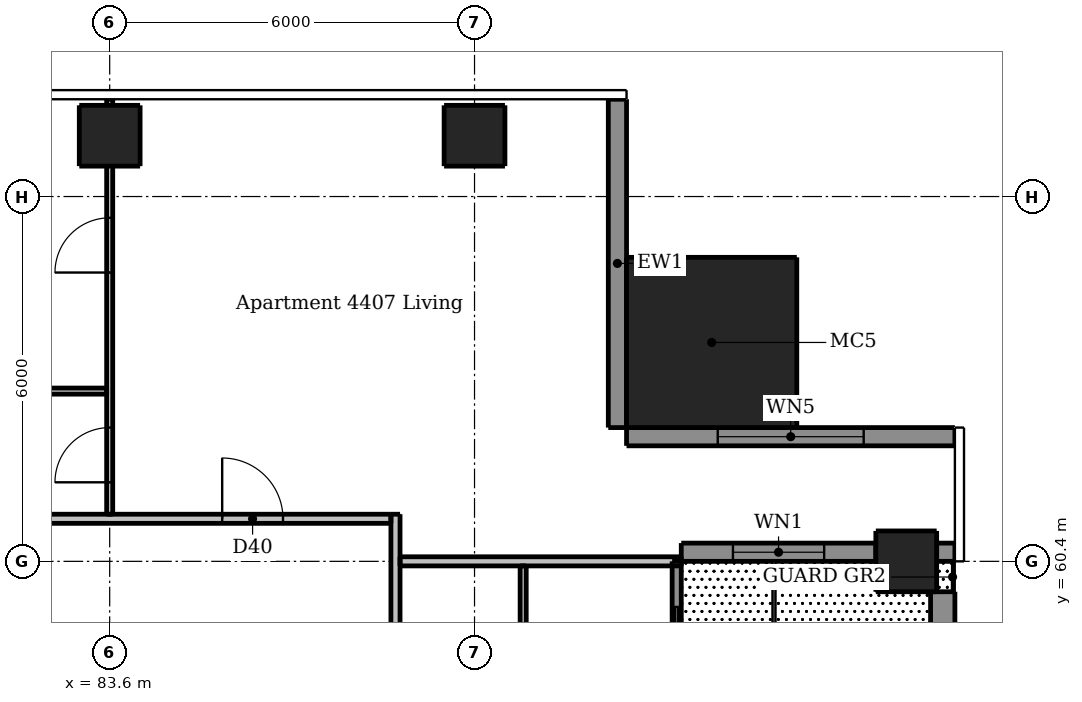
"""IFC4 building model, lengths in metres.
Left out: names, types, materials, properties, quantities, classifications, styles, units other than length and angle.
Written with IfcOpenShell. Run it as: python <this file> out.ifc"""

import sys

from ifc_helpers import new_model, si_unit, direction, frame, frame_2d, origin, origin_2d, place, context, subcontext, project, spatial, rectangle, extrude, element, fill, save


model = new_model("IFC4")
c1 = context("Model", 3, precision=1e-05, world=origin(), true_north=direction((0.0, 1.0)))
c2 = subcontext(c1, "Body", "Model", "MODEL_VIEW")
j1 = project(units=[si_unit("LENGTHUNIT", "METRE"), si_unit("PLANEANGLEUNIT", "RADIAN")], contexts=[c1])
p1 = place(None, origin())
s1 = spatial("IfcSite", under=j1, at=p1, CompositionType="ELEMENT")
p2 = place(p1, origin())
s2 = spatial("IfcBuilding", under=s1, at=p2, CompositionType="ELEMENT")
p3 = place(p2, frame((0.0, 0.0, 164.8)))
s3 = spatial("IfcBuildingStorey", under=s2, at=p3, CompositionType="ELEMENT", Elevation=164.8)
for number, where, z_axis, x_axis in (
    (1, (96.7, 60.4, 0.0), (0.0, 0.0, 1.0), (1.0, 0.0, 0.0)),
    (2, (83.6, 67.4, 0.0), (0.0, 0.0, 1.0), (1.0, 0.0, 0.0)),
    (3, (89.6, 67.4, 0.0), (0.0, 0.0, 1.0), (1.0, 0.0, 0.0)),
):
    element("IfcColumn", number, at=place(p3, frame(where, z_axis=z_axis, x_axis=x_axis)), inside=s3, PredefinedType="COLUMN", context=c2, shape_type="SweptSolid", body=[
        extrude(rectangle(XDim=1.0, YDim=1.0, at=origin_2d()), origin(), (0.0, 0.0, 1.0), 3.05),
    ])
p4 = place(p3, frame((93.5, 64.0, 0.0), z_axis=(0.0, 0.0, 1.0), x_axis=(1.0, 0.0, 0.0)))
e4 = element("IfcColumn", 4, at=p4, inside=s3, PredefinedType="COLUMN", context=c2, shape_type="SweptSolid", body=[
    extrude(rectangle(XDim=2.8, YDim=2.8, at=origin_2d()), origin(), (0.0, 0.0, 1.0), 3.3),
])
p5 = place(p3, frame((93.0, 60.55, 0.0), z_axis=(0.0, 0.0, 1.0), x_axis=(1.0, 0.0, 0.0)))
e5 = element("IfcWall", 5, at=p5, inside=s3, PredefinedType="SOLIDWALL", context=c2, shape_type="SweptSolid", body=[
    extrude(rectangle(XDim=3.2, YDim=0.3, at=frame_2d((1.6, 0.0))), origin(), (0.0, 0.0, 1.0), 3.05),
])
p6 = place(p5, frame((0.85, 0.0, 0.9)))
e6 = element("IfcOpeningElement", 6, at=p6, cuts=e5, PredefinedType="OPENING", context=c2, shape_type="SweptSolid", body=[
    extrude(rectangle(XDim=1.5, YDim=1.5, at=frame_2d((0.75, 0.75))), frame((0.0, 0.16, 0.0), z_axis=(0.0, -1.0, 0.0), x_axis=(1.0, 0.0, 0.0)), (0.0, 0.0, 1.0), 0.32),
])
p7 = place(p3, frame((97.2, 60.55, 0.0), z_axis=(0.0, 0.0, 1.0), x_axis=(1.0, 0.0, 0.0)))
e7 = element("IfcWall", 7, at=p7, inside=s3, PredefinedType="SOLIDWALL", context=c2, shape_type="SweptSolid", body=[
    extrude(rectangle(XDim=0.3, YDim=0.3, at=frame_2d((0.15, 0.0))), origin(), (0.0, 0.0, 1.0), 3.05),
])
p8 = place(p3, frame((97.5, 62.45, 0.0), z_axis=(0.0, 0.0, 1.0), x_axis=(-1.0, 0.0, 0.0)))
e8 = element("IfcWall", 8, at=p8, inside=s3, PredefinedType="SOLIDWALL", context=c2, shape_type="SweptSolid", body=[
    extrude(rectangle(XDim=5.4, YDim=0.3, at=frame_2d((2.7, 0.0))), origin(), (0.0, 0.0, 1.0), 3.05),
])
p9 = place(p8, frame((1.5, 0.0, 0.15)))
e9 = element("IfcOpeningElement", 9, at=p9, cuts=e8, PredefinedType="OPENING", context=c2, shape_type="SweptSolid", body=[
    extrude(rectangle(XDim=2.4, YDim=2.1, at=frame_2d((1.2, 1.05))), frame((0.0, 0.16, 0.0), z_axis=(0.0, -1.0, 0.0), x_axis=(1.0, 0.0, 0.0)), (0.0, 0.0, 1.0), 0.32),
])
p10 = place(p3, frame((91.95, 62.6, 0.0), z_axis=(0.0, 0.0, 1.0), x_axis=(0.0, 1.0, 0.0)))
e10 = element("IfcWall", 10, at=p10, inside=s3, PredefinedType="SOLIDWALL", context=c2, shape_type="SweptSolid", body=[
    extrude(rectangle(XDim=5.4, YDim=0.3, at=frame_2d((2.7, 0.0))), origin(), (0.0, 0.0, 1.0), 3.05),
])
p11 = place(p3, frame((92.925, 57.4, 0.0), z_axis=(0.0, 0.0, 1.0), x_axis=(0.0, 1.0, 0.0)))
e11 = element("IfcWall", 11, at=p11, inside=s3, PredefinedType="SOLIDWALL", context=c2, shape_type="SweptSolid", body=[
    extrude(rectangle(XDim=3.0, YDim=0.15, at=frame_2d((1.5, 0.0))), origin(), (0.0, 0.0, 1.0), 3.05),
])
p12 = place(p11, frame((0.75, 0.0, 0.0)))
e12 = element("IfcOpeningElement", 12, at=p12, cuts=e11, PredefinedType="OPENING", context=c2, shape_type="SweptSolid", body=[
    extrude(rectangle(XDim=1.5, YDim=2.4, at=frame_2d((0.75, 1.2))), frame((0.0, 0.085, 0.0), z_axis=(0.0, -1.0, 0.0), x_axis=(1.0, 0.0, 0.0)), (0.0, 0.0, 1.0), 0.17),
])
p13 = place(p3, frame((97.3, 54.9, 0.03), z_axis=(0.0, 0.0, 1.0), x_axis=(0.0, 1.0, 0.0)))
e13 = element("IfcWall", 13, at=p13, inside=s3, PredefinedType="PARAPET", context=c2, shape_type="SweptSolid", body=[
    extrude(rectangle(XDim=5.0, YDim=0.4, at=frame_2d((2.5, 0.0))), origin(), (0.0, 0.0, 1.0), 1.1),
])
p14 = place(p3, frame((83.6, 61.175, 0.0), z_axis=(0.0, 0.0, 1.0), x_axis=(0.0, 1.0, 0.0)))
e14 = element("IfcWall", 14, at=p14, inside=s3, PredefinedType="PARTITIONING", context=c2, shape_type="SweptSolid", body=[
    extrude(rectangle(XDim=6.825, YDim=0.1, at=frame_2d((3.413, 0.0))), origin(), (0.0, 0.0, 1.0), 2.516),
])
p15 = place(p14, frame((0.525, 0.0, 0.0)))
e15 = element("IfcOpeningElement", 15, at=p15, cuts=e14, PredefinedType="OPENING", context=c2, shape_type="SweptSolid", body=[
    extrude(rectangle(XDim=0.9, YDim=2.1, at=frame_2d((0.45, 1.05))), frame((0.0, 0.06, 0.0), z_axis=(0.0, -1.0, 0.0), x_axis=(1.0, 0.0, 0.0)), (0.0, 0.0, 1.0), 0.12),
])
p16 = place(p14, frame((3.975, 0.0, 0.0)))
e16 = element("IfcOpeningElement", 16, at=p16, cuts=e14, PredefinedType="OPENING", context=c2, shape_type="SweptSolid", body=[
    extrude(rectangle(XDim=0.9, YDim=2.1, at=frame_2d((0.45, 1.05))), frame((0.0, 0.06, 0.0), z_axis=(0.0, -1.0, 0.0), x_axis=(1.0, 0.0, 0.0)), (0.0, 0.0, 1.0), 0.12),
])
p17 = place(p3, frame((90.4, 58.25, 0.0), z_axis=(0.0, 0.0, 1.0), x_axis=(0.0, 1.0, 0.0)))
e17 = element("IfcWall", 17, at=p17, inside=s3, PredefinedType="PARTITIONING", context=c2, shape_type="SweptSolid", body=[
    extrude(rectangle(XDim=2.075, YDim=0.1, at=frame_2d((1.038, 0.0))), origin(), (0.0, 0.0, 1.0), 3.05),
])
p18 = place(p3, frame((83.55, 63.2, 0.0), z_axis=(0.0, 0.0, 1.0), x_axis=(-1.0, 0.0, 0.0)))
e18 = element("IfcWall", 18, at=p18, inside=s3, PredefinedType="PARTITIONING", context=c2, shape_type="SweptSolid", body=[
    extrude(rectangle(XDim=5.875, YDim=0.1, at=frame_2d((2.938, 0.0))), origin(), (0.0, 0.0, 1.0), 3.05),
])
p19 = place(p18, frame((3.75, 0.0, 0.0)))
e19 = element("IfcOpeningElement", 19, at=p19, cuts=e18, PredefinedType="OPENING", context=c2, shape_type="SweptSolid", body=[
    extrude(rectangle(XDim=0.8, YDim=2.1, at=frame_2d((0.4, 1.05))), frame((0.0, 0.06, 0.0), z_axis=(0.0, -1.0, 0.0), x_axis=(1.0, 0.0, 0.0)), (0.0, 0.0, 1.0), 0.12),
])
p20 = place(p3, frame((88.3, 61.175, 0.0), z_axis=(0.0, 0.0, 1.0), x_axis=(0.0, -1.0, 0.0)))
e20 = element("IfcWall", 20, at=p20, inside=s3, PredefinedType="PARTITIONING", context=c2, shape_type="SweptSolid", body=[
    extrude(rectangle(XDim=29.4, YDim=0.15, at=frame_2d((14.7, 0.0))), origin(), (0.0, 0.0, 1.0), 3.05),
])
p21 = place(p20, frame((28.125, 0.0, 0.0)))
e21 = element("IfcOpeningElement", 21, at=p21, cuts=e20, PredefinedType="OPENING", context=c2, shape_type="SweptSolid", body=[
    extrude(rectangle(XDim=1.0, YDim=2.1, at=frame_2d((0.5, 1.05))), frame((0.0, 0.085, 0.0), z_axis=(0.0, -1.0, 0.0), x_axis=(1.0, 0.0, 0.0)), (0.0, 0.0, 1.0), 0.17),
])
p22 = place(p20, frame((13.775, 0.0, 0.0)))
e22 = element("IfcOpeningElement", 22, at=p22, cuts=e20, PredefinedType="OPENING", context=c2, shape_type="SweptSolid", body=[
    extrude(rectangle(XDim=1.0, YDim=2.1, at=frame_2d((0.5, 1.05))), frame((0.0, 0.085, 0.0), z_axis=(0.0, -1.0, 0.0), x_axis=(1.0, 0.0, 0.0)), (0.0, 0.0, 1.0), 0.17),
])
p23 = place(p20, frame((3.275, 0.0, 0.0)))
e23 = element("IfcOpeningElement", 23, at=p23, cuts=e20, PredefinedType="OPENING", context=c2, shape_type="SweptSolid", body=[
    extrude(rectangle(XDim=1.0, YDim=2.1, at=frame_2d((0.5, 1.05))), frame((0.0, 0.085, 0.0), z_axis=(0.0, -1.0, 0.0), x_axis=(1.0, 0.0, 0.0)), (0.0, 0.0, 1.0), 0.17),
])
p24 = place(p3, frame((58.975, 61.1, 0.0), z_axis=(0.0, 0.0, 1.0), x_axis=(1.0, 0.0, 0.0)))
e24 = element("IfcWall", 24, at=p24, inside=s3, PredefinedType="PARTITIONING", context=c2, shape_type="SweptSolid", body=[
    extrude(rectangle(XDim=29.25, YDim=0.15, at=frame_2d((14.625, 0.0))), origin(), (0.0, 0.0, 1.0), 3.05),
])
p25 = place(p24, frame((9.125, 0.0, 0.0)))
e25 = element("IfcOpeningElement", 25, at=p25, cuts=e24, PredefinedType="OPENING", context=c2, shape_type="SweptSolid", body=[
    extrude(rectangle(XDim=1.0, YDim=2.1, at=frame_2d((0.5, 1.05))), frame((0.0, 0.085, 0.0), z_axis=(0.0, -1.0, 0.0), x_axis=(1.0, 0.0, 0.0)), (0.0, 0.0, 1.0), 0.17),
])
p26 = place(p24, frame((26.475, 0.0, 0.0)))
e26 = element("IfcOpeningElement", 26, at=p26, cuts=e24, PredefinedType="OPENING", context=c2, shape_type="SweptSolid", body=[
    extrude(rectangle(XDim=1.0, YDim=2.1, at=frame_2d((0.5, 1.05))), frame((0.0, 0.085, 0.0), z_axis=(0.0, -1.0, 0.0), x_axis=(1.0, 0.0, 0.0)), (0.0, 0.0, 1.0), 0.17),
])
p27 = place(p3, frame((88.375, 60.4, 0.0), z_axis=(0.0, 0.0, 1.0), x_axis=(1.0, 0.0, 0.0)))
e27 = element("IfcWall", 27, at=p27, inside=s3, PredefinedType="PARTITIONING", context=c2, shape_type="SweptSolid", body=[
    extrude(rectangle(XDim=4.625, YDim=0.15, at=frame_2d((2.312, 0.0))), origin(), (0.0, 0.0, 1.0), 2.647),
])
p28 = place(p6, origin())
e28 = element("IfcWindow", 28, at=p28, inside=s3, PartitioningType="DOUBLE_PANEL_VERTICAL", PredefinedType="WINDOW", context=c2, shape_type="SweptSolid", body=[
    extrude(rectangle(XDim=1.5, YDim=1.5, at=frame_2d((0.75, 0.75))), frame((0.0, 0.03, 0.0), z_axis=(0.0, -1.0, 0.0), x_axis=(1.0, 0.0, 0.0)), (0.0, 0.0, 1.0), 0.06),
])
fill(e6, e28)
p29 = place(p9, origin())
e29 = element("IfcWindow", 29, at=p29, inside=s3, PartitioningType="DOUBLE_PANEL_VERTICAL", PredefinedType="WINDOW", context=c2, shape_type="SweptSolid", body=[
    extrude(rectangle(XDim=2.4, YDim=2.1, at=frame_2d((1.2, 1.05))), frame((0.0, 0.03, 0.0), z_axis=(0.0, -1.0, 0.0), x_axis=(1.0, 0.0, 0.0)), (0.0, 0.0, 1.0), 0.06),
])
fill(e9, e29)
p30 = place(p12, origin())
e30 = element("IfcDoor", 30, at=p30, inside=s3, OperationType="DOUBLE_DOOR_SLIDING", PredefinedType="DOOR", context=c2, shape_type="SweptSolid", body=[
    extrude(rectangle(XDim=1.5, YDim=2.4, at=frame_2d((0.75, 1.2))), frame((0.0, 0.025, 0.0), z_axis=(0.0, -1.0, 0.0), x_axis=(1.0, 0.0, 0.0)), (0.0, 0.0, 1.0), 0.05),
])
fill(e12, e30)
p31 = place(p26, origin())
e31 = element("IfcDoor", 31, at=p31, inside=s3, OperationType="SINGLE_SWING_LEFT", PredefinedType="DOOR", context=c2, shape_type="SweptSolid", body=[
    extrude(rectangle(XDim=1.0, YDim=2.1, at=frame_2d((0.5, 1.05))), frame((0.0, 0.025, 0.0), z_axis=(0.0, -1.0, 0.0), x_axis=(1.0, 0.0, 0.0)), (0.0, 0.0, 1.0), 0.05),
])
fill(e26, e31)
p32 = place(p15, origin())
e32 = element("IfcDoor", 32, at=p32, inside=s3, OperationType="SINGLE_SWING_LEFT", PredefinedType="DOOR", context=c2, shape_type="SweptSolid", body=[
    extrude(rectangle(XDim=0.9, YDim=2.1, at=frame_2d((0.45, 1.05))), frame((0.0, 0.025, 0.0), z_axis=(0.0, -1.0, 0.0), x_axis=(1.0, 0.0, 0.0)), (0.0, 0.0, 1.0), 0.05),
])
fill(e15, e32)
p33 = place(p16, origin())
e33 = element("IfcDoor", 33, at=p33, inside=s3, OperationType="SINGLE_SWING_LEFT", PredefinedType="DOOR", context=c2, shape_type="SweptSolid", body=[
    extrude(rectangle(XDim=0.9, YDim=2.1, at=frame_2d((0.45, 1.05))), frame((0.0, 0.025, 0.0), z_axis=(0.0, -1.0, 0.0), x_axis=(1.0, 0.0, 0.0)), (0.0, 0.0, 1.0), 0.05),
])
fill(e16, e33)
save(model, sys.argv[1])
